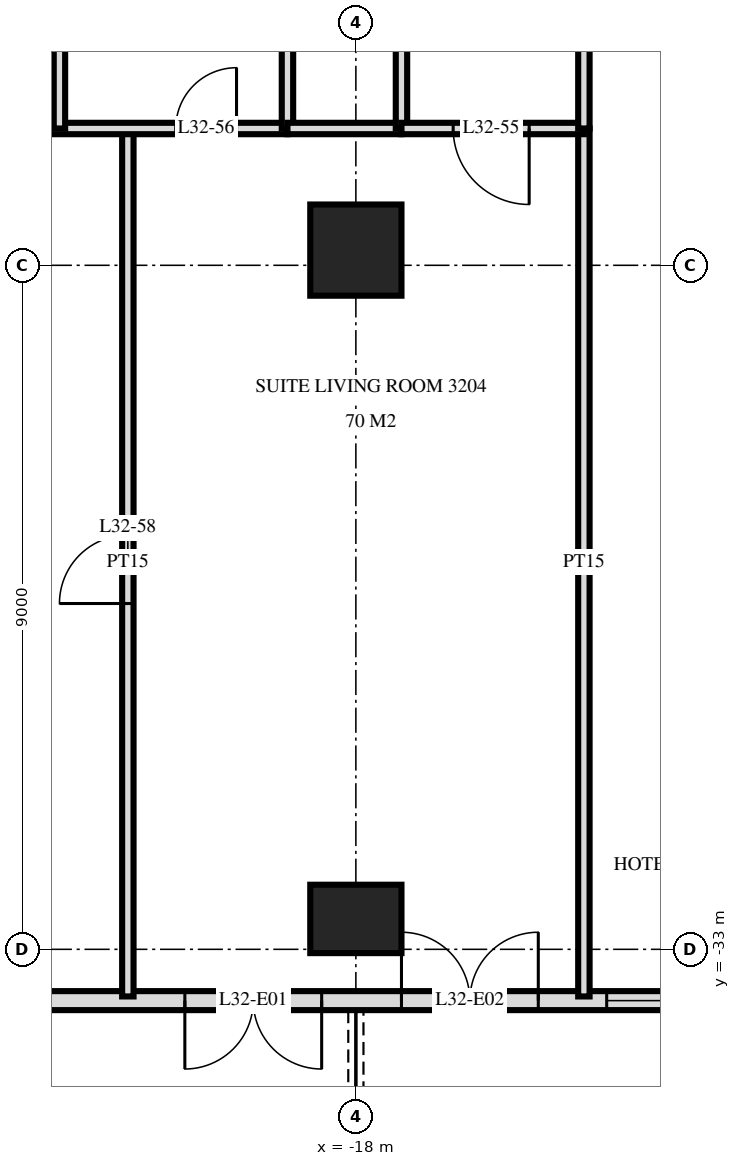
"""IFC4 building model, lengths in metres.
Left out: names, types, materials, properties, quantities, classifications, styles, units other than length and angle.
Written with IfcOpenShell. Run it as: python <this file> out.ifc"""

import sys

from ifc_helpers import new_model, si_unit, direction, frame, frame_2d, origin, origin_2d, place, context, subcontext, project, spatial, rectangle, extrude, element, fill, save


model = new_model("IFC4")
c1 = context("Model", 3, precision=1e-05, world=origin(), true_north=direction((0.0, 1.0)))
c2 = subcontext(c1, "Body", "Model", "MODEL_VIEW")
j1 = project(units=[si_unit("LENGTHUNIT", "METRE"), si_unit("PLANEANGLEUNIT", "RADIAN")], contexts=[c1])
p1 = place(None, origin())
s1 = spatial("IfcSite", under=j1, at=p1, CompositionType="ELEMENT")
p2 = place(p1, origin())
s2 = spatial("IfcBuilding", under=s1, at=p2, CompositionType="ELEMENT")
p3 = place(p2, frame((0.0, 0.0, 127.2)))
s3 = spatial("IfcBuildingStorey", under=s2, at=p3, CompositionType="ELEMENT", Elevation=127.2)
p4 = place(p3, frame((-18.0, -32.6, 0.0), z_axis=(0.0, 0.0, 1.0), x_axis=(1.0, 0.0, 0.0)))
e1 = element("IfcColumn", 1, at=p4, inside=s3, PredefinedType="COLUMN", context=c2, shape_type="SweptSolid", body=[
    extrude(rectangle(XDim=1.2, YDim=0.9, at=origin_2d()), origin(), (0.0, 0.0, 1.0), 3.6),
])
p5 = place(p3, frame((-18.0, -23.8, 0.0), z_axis=(0.0, 0.0, 1.0), x_axis=(1.0, 0.0, 0.0)))
e2 = element("IfcColumn", 2, at=p5, inside=s3, PredefinedType="COLUMN", context=c2, shape_type="SweptSolid", body=[
    extrude(rectangle(XDim=1.2, YDim=1.2, at=origin_2d()), origin(), (0.0, 0.0, 1.0), 3.6),
])
p6 = place(p3, frame((-23.675, -33.675, 0.0), z_axis=(0.0, 0.0, 1.0), x_axis=(1.0, 0.0, 0.0)))
e3 = element("IfcWall", 3, at=p6, inside=s3, PredefinedType="SOLIDWALL", context=c2, shape_type="SweptSolid", body=[
    extrude(rectangle(XDim=47.351, YDim=0.25, at=frame_2d((23.675, 0.0))), origin(), (0.0, 0.0, 1.0), 3.32),
])
p7 = place(p6, frame((3.425, 0.0, 0.0)))
e4 = element("IfcOpeningElement", 4, at=p7, cuts=e3, PredefinedType="OPENING", context=c2, shape_type="SweptSolid", body=[
    extrude(rectangle(XDim=1.8, YDim=2.4, at=frame_2d((0.9, 1.2))), frame((0.0, 0.135, 0.0), z_axis=(0.0, -1.0, 0.0), x_axis=(1.0, 0.0, 0.0)), (0.0, 0.0, 1.0), 0.27),
])
p8 = place(p6, frame((6.275, 0.0, 0.0)))
e5 = element("IfcOpeningElement", 5, at=p8, cuts=e3, PredefinedType="OPENING", context=c2, shape_type="SweptSolid", body=[
    extrude(rectangle(XDim=1.8, YDim=2.4, at=frame_2d((0.9, 1.2))), frame((0.0, 0.135, 0.0), z_axis=(0.0, -1.0, 0.0), x_axis=(1.0, 0.0, 0.0)), (0.0, 0.0, 1.0), 0.27),
])
p9 = place(p6, frame((8.975, 0.0, 0.3)))
e6 = element("IfcOpeningElement", 6, at=p9, cuts=e3, PredefinedType="OPENING", context=c2, shape_type="SweptSolid", body=[
    extrude(rectangle(XDim=2.4, YDim=2.1, at=frame_2d((1.2, 1.05))), frame((0.0, 0.135, 0.0), z_axis=(0.0, -1.0, 0.0), x_axis=(1.0, 0.0, 0.0)), (0.0, 0.0, 1.0), 0.27),
])
p10 = place(p6, frame((12.275, 0.0, 0.0)))
e7 = element("IfcOpeningElement", 7, at=p10, cuts=e3, PredefinedType="OPENING", context=c2, shape_type="SweptSolid", body=[
    extrude(rectangle(XDim=1.8, YDim=2.4, at=frame_2d((0.9, 1.2))), frame((0.0, 0.135, 0.0), z_axis=(0.0, -1.0, 0.0), x_axis=(1.0, 0.0, 0.0)), (0.0, 0.0, 1.0), 0.27),
])
p11 = place(p6, frame((14.975, 0.0, 0.3)))
e8 = element("IfcOpeningElement", 8, at=p11, cuts=e3, PredefinedType="OPENING", context=c2, shape_type="SweptSolid", body=[
    extrude(rectangle(XDim=2.4, YDim=2.1, at=frame_2d((1.2, 1.05))), frame((0.0, 0.135, 0.0), z_axis=(0.0, -1.0, 0.0), x_axis=(1.0, 0.0, 0.0)), (0.0, 0.0, 1.0), 0.27),
])
p12 = place(p6, frame((17.975, 0.0, 0.3)))
e9 = element("IfcOpeningElement", 9, at=p12, cuts=e3, PredefinedType="OPENING", context=c2, shape_type="SweptSolid", body=[
    extrude(rectangle(XDim=2.4, YDim=2.1, at=frame_2d((1.2, 1.05))), frame((0.0, 0.135, 0.0), z_axis=(0.0, -1.0, 0.0), x_axis=(1.0, 0.0, 0.0)), (0.0, 0.0, 1.0), 0.27),
])
p13 = place(p6, frame((21.275, 0.0, 0.0)))
e10 = element("IfcOpeningElement", 10, at=p13, cuts=e3, PredefinedType="OPENING", context=c2, shape_type="SweptSolid", body=[
    extrude(rectangle(XDim=1.8, YDim=2.4, at=frame_2d((0.9, 1.2))), frame((0.0, 0.135, 0.0), z_axis=(0.0, -1.0, 0.0), x_axis=(1.0, 0.0, 0.0)), (0.0, 0.0, 1.0), 0.27),
])
p14 = place(p6, frame((24.275, 0.0, 0.0)))
e11 = element("IfcOpeningElement", 11, at=p14, cuts=e3, PredefinedType="OPENING", context=c2, shape_type="SweptSolid", body=[
    extrude(rectangle(XDim=1.8, YDim=2.4, at=frame_2d((0.9, 1.2))), frame((0.0, 0.135, 0.0), z_axis=(0.0, -1.0, 0.0), x_axis=(1.0, 0.0, 0.0)), (0.0, 0.0, 1.0), 0.27),
])
p15 = place(p6, frame((26.975, 0.0, 0.3)))
e12 = element("IfcOpeningElement", 12, at=p15, cuts=e3, PredefinedType="OPENING", context=c2, shape_type="SweptSolid", body=[
    extrude(rectangle(XDim=2.4, YDim=2.1, at=frame_2d((1.2, 1.05))), frame((0.0, 0.135, 0.0), z_axis=(0.0, -1.0, 0.0), x_axis=(1.0, 0.0, 0.0)), (0.0, 0.0, 1.0), 0.27),
])
p16 = place(p6, frame((30.275, 0.0, 0.0)))
e13 = element("IfcOpeningElement", 13, at=p16, cuts=e3, PredefinedType="OPENING", context=c2, shape_type="SweptSolid", body=[
    extrude(rectangle(XDim=1.8, YDim=2.4, at=frame_2d((0.9, 1.2))), frame((0.0, 0.135, 0.0), z_axis=(0.0, -1.0, 0.0), x_axis=(1.0, 0.0, 0.0)), (0.0, 0.0, 1.0), 0.27),
])
p17 = place(p6, frame((32.975, 0.0, 0.3)))
e14 = element("IfcOpeningElement", 14, at=p17, cuts=e3, PredefinedType="OPENING", context=c2, shape_type="SweptSolid", body=[
    extrude(rectangle(XDim=2.4, YDim=2.1, at=frame_2d((1.2, 1.05))), frame((0.0, 0.135, 0.0), z_axis=(0.0, -1.0, 0.0), x_axis=(1.0, 0.0, 0.0)), (0.0, 0.0, 1.0), 0.27),
])
p18 = place(p6, frame((36.275, 0.0, 0.0)))
e15 = element("IfcOpeningElement", 15, at=p18, cuts=e3, PredefinedType="OPENING", context=c2, shape_type="SweptSolid", body=[
    extrude(rectangle(XDim=1.8, YDim=2.4, at=frame_2d((0.9, 1.2))), frame((0.0, 0.135, 0.0), z_axis=(0.0, -1.0, 0.0), x_axis=(1.0, 0.0, 0.0)), (0.0, 0.0, 1.0), 0.27),
])
p19 = place(p6, frame((38.975, 0.0, 0.3)))
e16 = element("IfcOpeningElement", 16, at=p19, cuts=e3, PredefinedType="OPENING", context=c2, shape_type="SweptSolid", body=[
    extrude(rectangle(XDim=2.4, YDim=2.1, at=frame_2d((1.2, 1.05))), frame((0.0, 0.135, 0.0), z_axis=(0.0, -1.0, 0.0), x_axis=(1.0, 0.0, 0.0)), (0.0, 0.0, 1.0), 0.27),
])
p20 = place(p6, frame((41.975, 0.0, 0.3)))
e17 = element("IfcOpeningElement", 17, at=p20, cuts=e3, PredefinedType="OPENING", context=c2, shape_type="SweptSolid", body=[
    extrude(rectangle(XDim=2.4, YDim=2.1, at=frame_2d((1.2, 1.05))), frame((0.0, 0.135, 0.0), z_axis=(0.0, -1.0, 0.0), x_axis=(1.0, 0.0, 0.0)), (0.0, 0.0, 1.0), 0.27),
])
p21 = place(p6, frame((45.125, 0.0, 0.0)))
e18 = element("IfcOpeningElement", 18, at=p21, cuts=e3, PredefinedType="OPENING", context=c2, shape_type="SweptSolid", body=[
    extrude(rectangle(XDim=1.8, YDim=2.4, at=frame_2d((0.9, 1.2))), frame((0.0, 0.135, 0.0), z_axis=(0.0, -1.0, 0.0), x_axis=(1.0, 0.0, 0.0)), (0.0, 0.0, 1.0), 0.27),
])
p22 = place(p3, frame((-15.0, -22.2, 0.0), z_axis=(0.0, 0.0, 1.0), x_axis=(0.0, 1.0, 0.0)))
e19 = element("IfcWall", 19, at=p22, inside=s3, PredefinedType="PARTITIONING", context=c2, shape_type="SweptSolid", body=[
    extrude(rectangle(XDim=4.2, YDim=0.15, at=frame_2d((2.1, 0.0))), origin(), (0.0, 0.0, 1.0), 3.32),
])
p23 = place(p3, frame((-15.0, -33.62, 0.0), z_axis=(0.0, 0.0, 1.0), x_axis=(0.0, 1.0, 0.0)))
e20 = element("IfcWall", 20, at=p23, inside=s3, PredefinedType="PARTITIONING", context=c2, shape_type="SweptSolid", body=[
    extrude(rectangle(XDim=11.42, YDim=0.15, at=frame_2d((5.71, 0.0))), origin(), (0.0, 0.0, 1.0), 3.32),
])
p24 = place(p3, frame((-17.4, -22.2, 0.0), z_axis=(0.0, 0.0, 1.0), x_axis=(0.0, 1.0, 0.0)))
e21 = element("IfcWall", 21, at=p24, inside=s3, PredefinedType="PARTITIONING", context=c2, shape_type="SweptSolid", body=[
    extrude(rectangle(XDim=4.2, YDim=0.15, at=frame_2d((2.1, 0.0))), origin(), (0.0, 0.0, 1.0), 3.32),
])
p25 = place(p24, frame((1.58, 0.0, 0.0)))
e22 = element("IfcOpeningElement", 22, at=p25, cuts=e21, PredefinedType="OPENING", context=c2, shape_type="SweptSolid", body=[
    extrude(rectangle(XDim=1.0, YDim=2.1, at=frame_2d((0.5, 1.05))), frame((0.0, 0.085, 0.0), z_axis=(0.0, -1.0, 0.0), x_axis=(1.0, 0.0, 0.0)), (0.0, 0.0, 1.0), 0.17),
])
p26 = place(p3, frame((-18.9, -22.2, 0.0), z_axis=(0.0, 0.0, 1.0), x_axis=(0.0, 1.0, 0.0)))
e23 = element("IfcWall", 23, at=p26, inside=s3, PredefinedType="PLUMBINGWALL", context=c2, shape_type="SweptSolid", body=[
    extrude(rectangle(XDim=4.2, YDim=0.15, at=frame_2d((2.1, 0.0))), origin(), (0.0, 0.0, 1.0), 3.32),
])
p27 = place(p3, frame((-21.0, -33.62, 0.0), z_axis=(0.0, 0.0, 1.0), x_axis=(0.0, 1.0, 0.0)))
e24 = element("IfcWall", 24, at=p27, inside=s3, PredefinedType="PARTITIONING", context=c2, shape_type="SweptSolid", body=[
    extrude(rectangle(XDim=11.42, YDim=0.15, at=frame_2d((5.71, 0.0))), origin(), (0.0, 0.0, 1.0), 3.32),
])
p28 = place(p27, frame((5.17, 0.0, 0.0)))
e25 = element("IfcOpeningElement", 25, at=p28, cuts=e24, PredefinedType="OPENING", context=c2, shape_type="SweptSolid", body=[
    extrude(rectangle(XDim=0.9, YDim=2.1, at=frame_2d((0.45, 1.05))), frame((0.0, 0.085, 0.0), z_axis=(0.0, -1.0, 0.0), x_axis=(1.0, 0.0, 0.0)), (0.0, 0.0, 1.0), 0.17),
])
p29 = place(p3, frame((-21.9, -22.2, 0.0), z_axis=(0.0, 0.0, 1.0), x_axis=(0.0, 1.0, 0.0)))
e26 = element("IfcWall", 26, at=p29, inside=s3, PredefinedType="PARTITIONING", context=c2, shape_type="SweptSolid", body=[
    extrude(rectangle(XDim=4.2, YDim=0.15, at=frame_2d((2.1, 0.0))), origin(), (0.0, 0.0, 1.0), 3.32),
])
p30 = place(p3, frame((-17.4, -22.2, 0.0), z_axis=(0.0, 0.0, 1.0), x_axis=(1.0, 0.0, 0.0)))
e27 = element("IfcWall", 27, at=p30, inside=s3, PredefinedType="PARTITIONING", context=c2, shape_type="SweptSolid", body=[
    extrude(rectangle(XDim=2.4, YDim=0.15, at=frame_2d((1.2, 0.0))), origin(), (0.0, 0.0, 1.0), 3.32),
])
p31 = place(p30, frame((0.68, 0.0, 0.0)))
e28 = element("IfcOpeningElement", 28, at=p31, cuts=e27, PredefinedType="OPENING", context=c2, shape_type="SweptSolid", body=[
    extrude(rectangle(XDim=1.0, YDim=2.1, at=frame_2d((0.5, 1.05))), frame((0.0, 0.085, 0.0), z_axis=(0.0, -1.0, 0.0), x_axis=(1.0, 0.0, 0.0)), (0.0, 0.0, 1.0), 0.17),
])
p32 = place(p3, frame((-28.02, -22.2, 0.0), z_axis=(0.0, 0.0, 1.0), x_axis=(1.0, 0.0, 0.0)))
e29 = element("IfcWall", 29, at=p32, inside=s3, PredefinedType="PARTITIONING", context=c2, shape_type="SweptSolid", body=[
    extrude(rectangle(XDim=9.12, YDim=0.15, at=frame_2d((4.56, 0.0))), origin(), (0.0, 0.0, 1.0), 3.32),
])
p33 = place(p32, frame((7.65, 0.0, 0.0)))
e30 = element("IfcOpeningElement", 30, at=p33, cuts=e29, PredefinedType="OPENING", context=c2, shape_type="SweptSolid", body=[
    extrude(rectangle(XDim=0.8, YDim=2.1, at=frame_2d((0.4, 1.05))), frame((0.0, 0.085, 0.0), z_axis=(0.0, -1.0, 0.0), x_axis=(1.0, 0.0, 0.0)), (0.0, 0.0, 1.0), 0.17),
])
p34 = place(p32, frame((2.5, 0.0, 0.0)))
e31 = element("IfcOpeningElement", 31, at=p34, cuts=e29, PredefinedType="OPENING", context=c2, shape_type="SweptSolid", body=[
    extrude(rectangle(XDim=0.9, YDim=2.1, at=frame_2d((0.45, 1.05))), frame((0.0, 0.085, 0.0), z_axis=(0.0, -1.0, 0.0), x_axis=(1.0, 0.0, 0.0)), (0.0, 0.0, 1.0), 0.17),
])
p35 = place(p3, frame((-18.9, -22.2, 0.0), z_axis=(0.0, 0.0, 1.0), x_axis=(1.0, 0.0, 0.0)))
e32 = element("IfcWall", 32, at=p35, inside=s3, PredefinedType="PLUMBINGWALL", context=c2, shape_type="SweptSolid", body=[
    extrude(rectangle(XDim=1.5, YDim=0.15, at=frame_2d((0.75, 0.0))), origin(), (0.0, 0.0, 1.0), 3.32),
])
p36 = place(p7, frame((0.9, 0.0, 0.0), z_axis=(0.0, 0.0, 1.0), x_axis=(-1.0, 0.0, 0.0)))
e33 = element("IfcDoor", 33, at=p36, inside=s3, OperationType="DOUBLE_DOOR_SINGLE_SWING", PredefinedType="DOOR", context=c2, shape_type="SweptSolid", body=[
    extrude(rectangle(XDim=1.8, YDim=2.4, at=frame_2d((0.0, 1.2))), frame((0.0, -0.025, 0.0), z_axis=(0.0, 1.0, 0.0), x_axis=(-1.0, 0.0, 0.0)), (0.0, 0.0, 1.0), 0.05),
])
fill(e4, e33)
p37 = place(p8, origin())
e34 = element("IfcDoor", 34, at=p37, inside=s3, OperationType="DOUBLE_DOOR_SINGLE_SWING", PredefinedType="DOOR", context=c2, shape_type="SweptSolid", body=[
    extrude(rectangle(XDim=1.8, YDim=2.4, at=frame_2d((0.9, 1.2))), frame((0.0, 0.025, 0.0), z_axis=(0.0, -1.0, 0.0), x_axis=(1.0, 0.0, 0.0)), (0.0, 0.0, 1.0), 0.05),
])
fill(e5, e34)
p38 = place(p9, origin())
e35 = element("IfcWindow", 35, at=p38, inside=s3, PartitioningType="SINGLE_PANEL", PredefinedType="WINDOW", context=c2, shape_type="SweptSolid", body=[
    extrude(rectangle(XDim=2.4, YDim=2.1, at=frame_2d((1.2, 1.05))), frame((0.0, 0.03, 0.0), z_axis=(0.0, -1.0, 0.0), x_axis=(1.0, 0.0, 0.0)), (0.0, 0.0, 1.0), 0.06),
])
fill(e6, e35)
p39 = place(p31, frame((0.5, 0.0, 0.0), z_axis=(0.0, 0.0, 1.0), x_axis=(-1.0, 0.0, 0.0)))
e36 = element("IfcDoor", 36, at=p39, inside=s3, OperationType="SINGLE_SWING_RIGHT", PredefinedType="DOOR", context=c2, shape_type="SweptSolid", body=[
    extrude(rectangle(XDim=1.0, YDim=2.1, at=frame_2d((0.0, 1.05))), frame((0.0, -0.025, 0.0), z_axis=(0.0, 1.0, 0.0), x_axis=(-1.0, 0.0, 0.0)), (0.0, 0.0, 1.0), 0.05),
])
fill(e28, e36)
p40 = place(p33, origin())
e37 = element("IfcDoor", 37, at=p40, inside=s3, OperationType="SINGLE_SWING_LEFT", PredefinedType="DOOR", context=c2, shape_type="SweptSolid", body=[
    extrude(rectangle(XDim=0.8, YDim=2.1, at=frame_2d((0.4, 1.05))), frame((0.0, 0.025, 0.0), z_axis=(0.0, -1.0, 0.0), x_axis=(1.0, 0.0, 0.0)), (0.0, 0.0, 1.0), 0.05),
])
fill(e30, e37)
p41 = place(p28, origin())
e38 = element("IfcDoor", 38, at=p41, inside=s3, OperationType="SINGLE_SWING_RIGHT", PredefinedType="DOOR", context=c2, shape_type="SweptSolid", body=[
    extrude(rectangle(XDim=0.9, YDim=2.1, at=frame_2d((0.45, 1.05))), frame((0.0, 0.025, 0.0), z_axis=(0.0, -1.0, 0.0), x_axis=(1.0, 0.0, 0.0)), (0.0, 0.0, 1.0), 0.05),
])
fill(e25, e38)
save(model, sys.argv[1])
